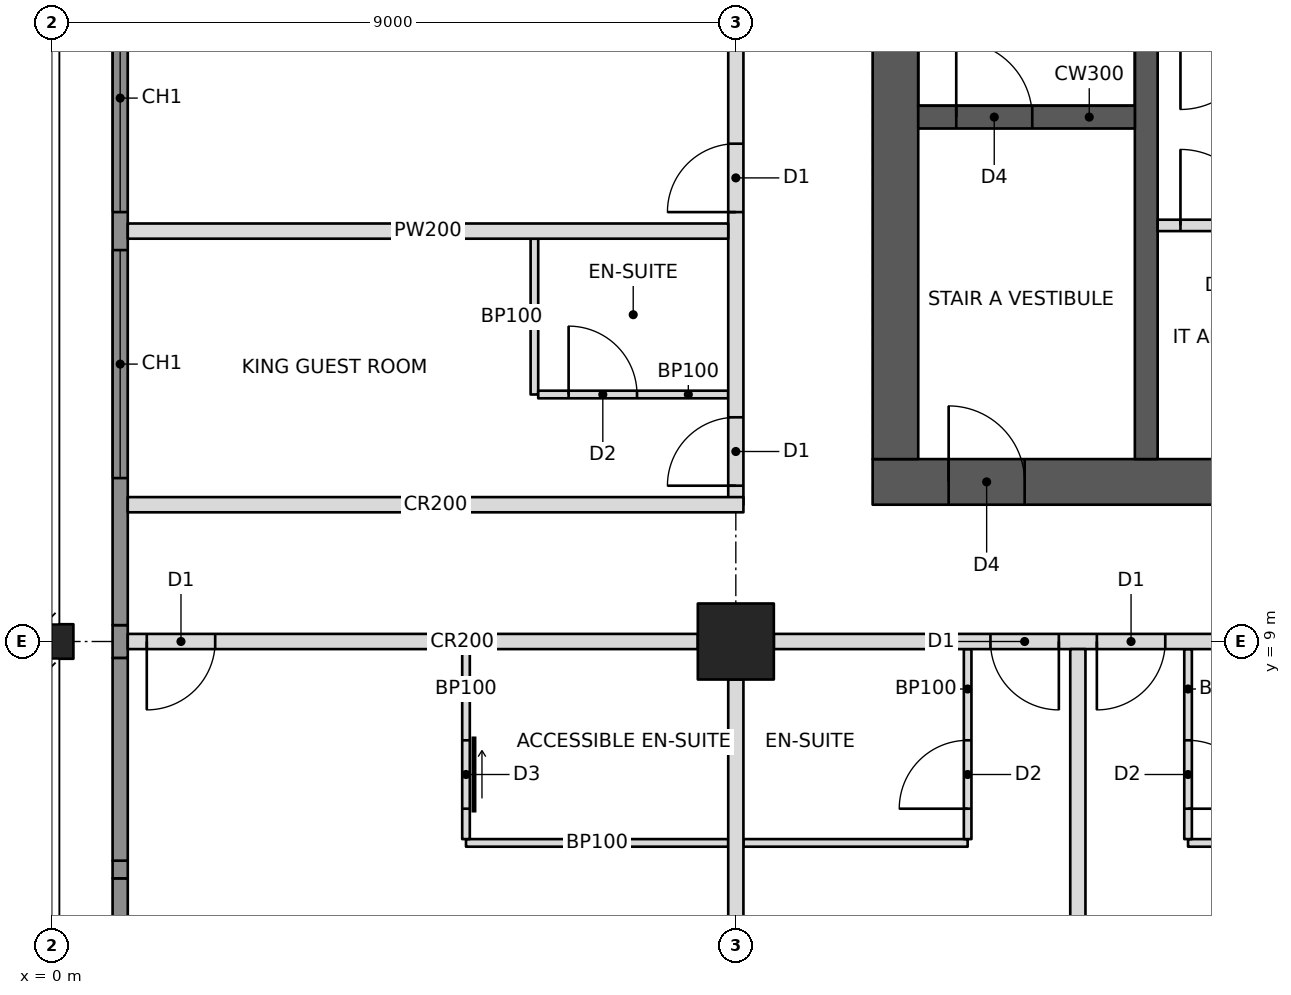
"""IFC4 building model, lengths in metres.
Left out: names, types, materials, properties, quantities, classifications, styles, units other than length and angle.
Written with IfcOpenShell. Run it as: python <this file> out.ifc"""

import sys

from ifc_helpers import new_model, si_unit, direction, frame, frame_2d, origin, origin_2d, place, context, subcontext, project, spatial, rectangle, hollow_rectangle, i_section, extrude, element, fill, save


model = new_model("IFC4")
c1 = context("Model", 3, precision=1e-05, world=origin(), true_north=direction((0.0, 1.0)))
c2 = subcontext(c1, "Body", "Model", "MODEL_VIEW")
j1 = project(units=[si_unit("LENGTHUNIT", "METRE"), si_unit("PLANEANGLEUNIT", "RADIAN")], contexts=[c1])
p1 = place(None, origin())
s1 = spatial("IfcSite", under=j1, at=p1, CompositionType="ELEMENT")
p2 = place(p1, origin())
s2 = spatial("IfcBuilding", under=s1, at=p2, CompositionType="ELEMENT")
p3 = place(p2, frame((0.0, 0.0, 85.8)))
s3 = spatial("IfcBuildingStorey", under=s2, at=p3, CompositionType="ELEMENT", Elevation=85.8)
p4 = place(p3, frame((0.0, 9.0, 0.0), z_axis=(0.0, 0.0, 1.0), x_axis=(0.0, 1.0, 0.0)))
e1 = element("IfcColumn", 1, at=p4, inside=s3, PredefinedType="COLUMN", context=c2, shape_type="SweptSolid", body=[
    extrude(i_section(OverallWidth=0.455, OverallDepth=0.569, WebThickness=0.078, FlangeThickness=0.125, at=origin_2d()), origin(), (0.0, 0.0, 1.0), 3.4),
])
p5 = place(p3, frame((9.0, 9.0, 0.0), z_axis=(0.0, 0.0, 1.0), x_axis=(1.0, 0.0, 0.0)))
e2 = element("IfcColumn", 2, at=p5, inside=s3, PredefinedType="COLUMN", context=c2, shape_type="SweptSolid", body=[
    extrude(hollow_rectangle(XDim=1.0, YDim=1.0, WallThickness=0.1, at=origin_2d()), origin(), (0.0, 0.0, 1.0), 3.4),
])
p6 = place(p3, frame((10.8, 11.1, 0.0), z_axis=(0.0, 0.0, 1.0), x_axis=(1.0, 0.0, 0.0)))
e3 = element("IfcWall", 3, at=p6, inside=s3, PredefinedType="SHEAR", context=c2, shape_type="SweptSolid", body=[
    extrude(rectangle(XDim=23.4, YDim=0.6, at=frame_2d((11.7, 0.0))), origin(), (0.0, 0.0, 1.0), 3.4),
])
p7 = place(p6, frame((1.0, 0.0, 0.0)))
e4 = element("IfcOpeningElement", 4, at=p7, cuts=e3, PredefinedType="OPENING", context=c2, shape_type="SweptSolid", body=[
    extrude(rectangle(XDim=1.0, YDim=2.1, at=frame_2d((0.5, 1.05))), frame((0.0, 0.31, 0.0), z_axis=(0.0, -1.0, 0.0), x_axis=(1.0, 0.0, 0.0)), (0.0, 0.0, 1.0), 0.62),
])
p8 = place(p6, frame((17.2, 0.0, 0.0)))
e5 = element("IfcOpeningElement", 5, at=p8, cuts=e3, PredefinedType="OPENING", context=c2, shape_type="SweptSolid", body=[
    extrude(rectangle(XDim=1.8, YDim=2.1, at=frame_2d((0.9, 1.05))), frame((0.0, 0.31, 0.0), z_axis=(0.0, -1.0, 0.0), x_axis=(1.0, 0.0, 0.0)), (0.0, 0.0, 1.0), 0.62),
])
p9 = place(p3, frame((11.1, 11.4, 0.0), z_axis=(0.0, 0.0, 1.0), x_axis=(0.0, 1.0, 0.0)))
e6 = element("IfcWall", 6, at=p9, inside=s3, PredefinedType="SHEAR", context=c2, shape_type="SweptSolid", body=[
    extrude(rectangle(XDim=13.2, YDim=0.6, at=frame_2d((6.6, 0.0))), origin(), (0.0, 0.0, 1.0), 3.4),
])
p10 = place(p3, frame((14.4, 11.4, 0.0), z_axis=(0.0, 0.0, 1.0), x_axis=(0.0, 1.0, 0.0)))
e7 = element("IfcWall", 7, at=p10, inside=s3, PredefinedType="SHEAR", context=c2, shape_type="SweptSolid", body=[
    extrude(rectangle(XDim=13.2, YDim=0.3, at=frame_2d((6.6, 0.0))), origin(), (0.0, 0.0, 1.0), 3.4),
])
p11 = place(p3, frame((11.4, 15.9, 0.0), z_axis=(0.0, 0.0, 1.0), x_axis=(1.0, 0.0, 0.0)))
e8 = element("IfcWall", 8, at=p11, inside=s3, PredefinedType="SHEAR", context=c2, shape_type="SweptSolid", body=[
    extrude(rectangle(XDim=2.85, YDim=0.3, at=frame_2d((1.425, 0.0))), origin(), (0.0, 0.0, 1.0), 3.4),
])
p12 = place(p11, frame((0.5, 0.0, 0.0)))
e9 = element("IfcOpeningElement", 9, at=p12, cuts=e8, PredefinedType="OPENING", context=c2, shape_type="SweptSolid", body=[
    extrude(rectangle(XDim=1.0, YDim=2.1, at=frame_2d((0.5, 1.05))), frame((0.0, 0.16, 0.0), z_axis=(0.0, -1.0, 0.0), x_axis=(1.0, 0.0, 0.0)), (0.0, 0.0, 1.0), 0.32),
])
p13 = place(p3, frame((1.0, 9.0, 0.0), z_axis=(0.0, 0.0, 1.0), x_axis=(1.0, 0.0, 0.0)))
e10 = element("IfcWall", 10, at=p13, inside=s3, PredefinedType="PARTITIONING", context=c2, shape_type="SweptSolid", body=[
    extrude(rectangle(XDim=7.5, YDim=0.2, at=frame_2d((3.75, 0.0))), origin(), (0.0, 0.0, 1.0), 2.21),
])
p14 = place(p13, frame((0.25, 0.0, 0.0)))
e11 = element("IfcOpeningElement", 11, at=p14, cuts=e10, PredefinedType="OPENING", context=c2, shape_type="SweptSolid", body=[
    extrude(rectangle(XDim=0.9, YDim=2.1, at=frame_2d((0.45, 1.05))), frame((0.0, 0.11, 0.0), z_axis=(0.0, -1.0, 0.0), x_axis=(1.0, 0.0, 0.0)), (0.0, 0.0, 1.0), 0.22),
])
p15 = place(p3, frame((9.5, 9.0, 0.0), z_axis=(0.0, 0.0, 1.0), x_axis=(1.0, 0.0, 0.0)))
e12 = element("IfcWall", 12, at=p15, inside=s3, PredefinedType="PARTITIONING", context=c2, shape_type="SweptSolid", body=[
    extrude(rectangle(XDim=8.0, YDim=0.2, at=frame_2d((4.0, 0.0))), origin(), (0.0, 0.0, 1.0), 2.21),
])
p16 = place(p15, frame((2.85, 0.0, 0.0)))
e13 = element("IfcOpeningElement", 13, at=p16, cuts=e12, PredefinedType="OPENING", context=c2, shape_type="SweptSolid", body=[
    extrude(rectangle(XDim=0.9, YDim=2.1, at=frame_2d((0.45, 1.05))), frame((0.0, 0.11, 0.0), z_axis=(0.0, -1.0, 0.0), x_axis=(1.0, 0.0, 0.0)), (0.0, 0.0, 1.0), 0.22),
])
p17 = place(p15, frame((4.25, 0.0, 0.0)))
e14 = element("IfcOpeningElement", 14, at=p17, cuts=e12, PredefinedType="OPENING", context=c2, shape_type="SweptSolid", body=[
    extrude(rectangle(XDim=0.9, YDim=2.1, at=frame_2d((0.45, 1.05))), frame((0.0, 0.11, 0.0), z_axis=(0.0, -1.0, 0.0), x_axis=(1.0, 0.0, 0.0)), (0.0, 0.0, 1.0), 0.22),
])
p18 = place(p3, frame((9.0, 10.8, 0.0), z_axis=(0.0, 0.0, 1.0), x_axis=(0.0, 1.0, 0.0)))
e15 = element("IfcWall", 15, at=p18, inside=s3, PredefinedType="PARTITIONING", context=c2, shape_type="SweptSolid", body=[
    extrude(rectangle(XDim=6.7, YDim=0.2, at=frame_2d((3.35, 0.0))), origin(), (0.0, 0.0, 1.0), 2.21),
])
p19 = place(p18, frame((0.25, 0.0, 0.0)))
e16 = element("IfcOpeningElement", 16, at=p19, cuts=e15, PredefinedType="OPENING", context=c2, shape_type="SweptSolid", body=[
    extrude(rectangle(XDim=0.9, YDim=2.1, at=frame_2d((0.45, 1.05))), frame((0.0, 0.11, 0.0), z_axis=(0.0, -1.0, 0.0), x_axis=(1.0, 0.0, 0.0)), (0.0, 0.0, 1.0), 0.22),
])
p20 = place(p18, frame((3.85, 0.0, 0.0)))
e17 = element("IfcOpeningElement", 17, at=p20, cuts=e15, PredefinedType="OPENING", context=c2, shape_type="SweptSolid", body=[
    extrude(rectangle(XDim=0.9, YDim=2.1, at=frame_2d((0.45, 1.05))), frame((0.0, 0.11, 0.0), z_axis=(0.0, -1.0, 0.0), x_axis=(1.0, 0.0, 0.0)), (0.0, 0.0, 1.0), 0.22),
])
p21 = place(p3, frame((1.0, 10.8, 0.0), z_axis=(0.0, 0.0, 1.0), x_axis=(1.0, 0.0, 0.0)))
e18 = element("IfcWall", 18, at=p21, inside=s3, PredefinedType="PARTITIONING", context=c2, shape_type="SweptSolid", body=[
    extrude(rectangle(XDim=8.1, YDim=0.2, at=frame_2d((4.05, 0.0))), origin(), (0.0, 0.0, 1.0), 2.21),
])
p22 = place(p3, frame((9.0, 8.5, 0.0), z_axis=(0.0, 0.0, 1.0), x_axis=(0.0, -1.0, 0.0)))
e19 = element("IfcWall", 19, at=p22, inside=s3, PredefinedType="PARTITIONING", context=c2, shape_type="SweptSolid", body=[
    extrude(rectangle(XDim=7.5, YDim=0.2, at=frame_2d((3.75, 0.0))), origin(), (0.0, 0.0, 1.0), 2.21),
])
p23 = place(p3, frame((13.5, 8.9, 0.0), z_axis=(0.0, 0.0, 1.0), x_axis=(0.0, -1.0, 0.0)))
e20 = element("IfcWall", 20, at=p23, inside=s3, PredefinedType="PARTITIONING", context=c2, shape_type="SweptSolid", body=[
    extrude(rectangle(XDim=7.9, YDim=0.2, at=frame_2d((3.95, 0.0))), origin(), (0.0, 0.0, 1.0), 2.21),
])
p24 = place(p3, frame((5.45, 6.35, 0.0), z_axis=(0.0, 0.0, 1.0), x_axis=(1.0, 0.0, 0.0)))
e21 = element("IfcWall", 21, at=p24, inside=s3, PredefinedType="PARTITIONING", context=c2, shape_type="SweptSolid", body=[
    extrude(rectangle(XDim=3.45, YDim=0.1, at=frame_2d((1.725, 0.0))), origin(), (0.0, 0.0, 1.0), 2.21),
])
p25 = place(p3, frame((5.45, 8.9, 0.0), z_axis=(0.0, 0.0, 1.0), x_axis=(0.0, -1.0, 0.0)))
e22 = element("IfcWall", 22, at=p25, inside=s3, PredefinedType="PARTITIONING", context=c2, shape_type="SweptSolid", body=[
    extrude(rectangle(XDim=2.5, YDim=0.1, at=frame_2d((1.25, 0.0))), origin(), (0.0, 0.0, 1.0), 2.21),
])
p26 = place(p25, frame((1.2, 0.0, 0.0)))
e23 = element("IfcOpeningElement", 23, at=p26, cuts=e22, PredefinedType="OPENING", context=c2, shape_type="SweptSolid", body=[
    extrude(rectangle(XDim=0.9, YDim=2.1, at=frame_2d((0.45, 1.05))), frame((0.0, 0.06, 0.0), z_axis=(0.0, -1.0, 0.0), x_axis=(1.0, 0.0, 0.0)), (0.0, 0.0, 1.0), 0.12),
])
p27 = place(p3, frame((9.1, 6.35, 0.0), z_axis=(0.0, 0.0, 1.0), x_axis=(1.0, 0.0, 0.0)))
e24 = element("IfcWall", 24, at=p27, inside=s3, PredefinedType="PARTITIONING", context=c2, shape_type="SweptSolid", body=[
    extrude(rectangle(XDim=2.95, YDim=0.1, at=frame_2d((1.475, 0.0))), origin(), (0.0, 0.0, 1.0), 2.21),
])
p28 = place(p3, frame((12.05, 8.9, 0.0), z_axis=(0.0, 0.0, 1.0), x_axis=(0.0, -1.0, 0.0)))
e25 = element("IfcWall", 25, at=p28, inside=s3, PredefinedType="PARTITIONING", context=c2, shape_type="SweptSolid", body=[
    extrude(rectangle(XDim=2.5, YDim=0.1, at=frame_2d((1.25, 0.0))), origin(), (0.0, 0.0, 1.0), 2.21),
])
p29 = place(p28, frame((1.2, 0.0, 0.0)))
e26 = element("IfcOpeningElement", 26, at=p29, cuts=e25, PredefinedType="OPENING", context=c2, shape_type="SweptSolid", body=[
    extrude(rectangle(XDim=0.9, YDim=2.1, at=frame_2d((0.45, 1.05))), frame((0.0, 0.06, 0.0), z_axis=(0.0, -1.0, 0.0), x_axis=(1.0, 0.0, 0.0)), (0.0, 0.0, 1.0), 0.12),
])
p30 = place(p3, frame((14.95, 6.35, 0.0), z_axis=(0.0, 0.0, 1.0), x_axis=(1.0, 0.0, 0.0)))
e27 = element("IfcWall", 27, at=p30, inside=s3, PredefinedType="PARTITIONING", context=c2, shape_type="SweptSolid", body=[
    extrude(rectangle(XDim=2.95, YDim=0.1, at=frame_2d((1.475, 0.0))), origin(), (0.0, 0.0, 1.0), 2.202),
])
p31 = place(p3, frame((14.95, 8.9, 0.0), z_axis=(0.0, 0.0, 1.0), x_axis=(0.0, -1.0, 0.0)))
e28 = element("IfcWall", 28, at=p31, inside=s3, PredefinedType="PARTITIONING", context=c2, shape_type="SweptSolid", body=[
    extrude(rectangle(XDim=2.5, YDim=0.1, at=frame_2d((1.25, 0.0))), origin(), (0.0, 0.0, 1.0), 2.21),
])
p32 = place(p31, frame((1.2, 0.0, 0.0)))
e29 = element("IfcOpeningElement", 29, at=p32, cuts=e28, PredefinedType="OPENING", context=c2, shape_type="SweptSolid", body=[
    extrude(rectangle(XDim=0.9, YDim=2.1, at=frame_2d((0.45, 1.05))), frame((0.0, 0.06, 0.0), z_axis=(0.0, -1.0, 0.0), x_axis=(1.0, 0.0, 0.0)), (0.0, 0.0, 1.0), 0.12),
])
p33 = place(p3, frame((8.9, 14.4, 0.0), z_axis=(0.0, 0.0, 1.0), x_axis=(-1.0, 0.0, 0.0)))
e30 = element("IfcWall", 30, at=p33, inside=s3, PredefinedType="PARTITIONING", context=c2, shape_type="SweptSolid", body=[
    extrude(rectangle(XDim=7.9, YDim=0.2, at=frame_2d((3.95, 0.0))), origin(), (0.0, 0.0, 1.0), 2.21),
])
p34 = place(p3, frame((6.35, 12.25, 0.0), z_axis=(0.0, 0.0, 1.0), x_axis=(0.0, 1.0, 0.0)))
e31 = element("IfcWall", 31, at=p34, inside=s3, PredefinedType="PARTITIONING", context=c2, shape_type="SweptSolid", body=[
    extrude(rectangle(XDim=2.05, YDim=0.1, at=frame_2d((1.025, 0.0))), origin(), (0.0, 0.0, 1.0), 3.15),
])
p35 = place(p3, frame((8.9, 12.25, 0.0), z_axis=(0.0, 0.0, 1.0), x_axis=(-1.0, 0.0, 0.0)))
e32 = element("IfcWall", 32, at=p35, inside=s3, PredefinedType="PARTITIONING", context=c2, shape_type="SweptSolid", body=[
    extrude(rectangle(XDim=2.5, YDim=0.1, at=frame_2d((1.25, 0.0))), origin(), (0.0, 0.0, 1.0), 2.21),
])
p36 = place(p35, frame((1.2, 0.0, 0.0)))
e33 = element("IfcOpeningElement", 33, at=p36, cuts=e32, PredefinedType="OPENING", context=c2, shape_type="SweptSolid", body=[
    extrude(rectangle(XDim=0.9, YDim=2.1, at=frame_2d((0.45, 1.05))), frame((0.0, 0.06, 0.0), z_axis=(0.0, -1.0, 0.0), x_axis=(1.0, 0.0, 0.0)), (0.0, 0.0, 1.0), 0.12),
])
p37 = place(p3, frame((14.55, 14.475, 0.0), z_axis=(0.0, 0.0, 1.0), x_axis=(1.0, 0.0, 0.0)))
e34 = element("IfcWall", 34, at=p37, inside=s3, PredefinedType="PARTITIONING", context=c2, shape_type="SweptSolid", body=[
    extrude(rectangle(XDim=3.3, YDim=0.15, at=frame_2d((1.65, 0.0))), origin(), (0.0, 0.0, 1.0), 3.15),
])
p38 = place(p37, frame((0.3, 0.0, 0.0)))
e35 = element("IfcOpeningElement", 35, at=p38, cuts=e34, PredefinedType="OPENING", context=c2, shape_type="SweptSolid", body=[
    extrude(rectangle(XDim=1.0, YDim=2.1, at=frame_2d((0.5, 1.05))), frame((0.0, 0.085, 0.0), z_axis=(0.0, -1.0, 0.0), x_axis=(1.0, 0.0, 0.0)), (0.0, 0.0, 1.0), 0.17),
])
p39 = place(p3, frame((0.9, 3.116, 0.0), z_axis=(0.0, 0.0, 1.0), x_axis=(0.0, 1.0, 0.0)))
e36 = element("IfcWall", 36, at=p39, inside=s3, PredefinedType="SOLIDWALL", context=c2, shape_type="SweptSolid", body=[
    extrude(rectangle(XDim=2.768, YDim=0.2, at=frame_2d((1.384, 0.0))), origin(), (0.0, 0.0, 1.0), 3.15),
])
p40 = place(p3, frame((0.9, 5.884, 0.0), z_axis=(0.0, 0.0, 1.0), x_axis=(0.0, 1.0, 0.0)))
e37 = element("IfcWall", 37, at=p40, inside=s3, PredefinedType="SOLIDWALL", context=c2, shape_type="SweptSolid", body=[
    extrude(rectangle(XDim=0.232, YDim=0.2, at=frame_2d((0.116, 0.0))), origin(), (0.0, 0.0, 1.0), 2.542),
])
p41 = place(p3, frame((0.9, 6.116, 0.0), z_axis=(0.0, 0.0, 1.0), x_axis=(0.0, 1.0, 0.0)))
e38 = element("IfcWall", 38, at=p41, inside=s3, PredefinedType="SOLIDWALL", context=c2, shape_type="SweptSolid", body=[
    extrude(rectangle(XDim=2.668, YDim=0.2, at=frame_2d((1.334, 0.0))), origin(), (0.0, 0.0, 1.0), 3.15),
])
p42 = place(p3, frame((0.9, 8.785, 0.0), z_axis=(0.0, 0.0, 1.0), x_axis=(0.0, 1.0, 0.0)))
e39 = element("IfcWall", 39, at=p42, inside=s3, PredefinedType="SOLIDWALL", context=c2, shape_type="SweptSolid", body=[
    extrude(rectangle(XDim=0.431, YDim=0.2, at=frame_2d((0.215, 0.0))), origin(), (0.0, 0.0, 1.0), 2.21),
])
p43 = place(p3, frame((0.9, 9.215, 0.0), z_axis=(0.0, 0.0, 1.0), x_axis=(0.0, 1.0, 0.0)))
e40 = element("IfcWall", 40, at=p43, inside=s3, PredefinedType="SOLIDWALL", context=c2, shape_type="SweptSolid", body=[
    extrude(rectangle(XDim=8.571, YDim=0.2, at=frame_2d((4.285, 0.0))), origin(), (0.0, 0.0, 1.0), 3.15),
])
p44 = place(p43, frame((1.935, 0.0, 0.6)))
e41 = element("IfcOpeningElement", 41, at=p44, cuts=e40, PredefinedType="OPENING", context=c2, shape_type="SweptSolid", body=[
    extrude(rectangle(XDim=3.0, YDim=2.2, at=frame_2d((1.5, 1.1))), frame((0.0, 0.11, 0.0), z_axis=(0.0, -1.0, 0.0), x_axis=(1.0, 0.0, 0.0)), (0.0, 0.0, 1.0), 0.22),
])
p45 = place(p43, frame((5.435, 0.0, 0.6)))
e42 = element("IfcOpeningElement", 42, at=p45, cuts=e40, PredefinedType="OPENING", context=c2, shape_type="SweptSolid", body=[
    extrude(rectangle(XDim=3.0, YDim=2.2, at=frame_2d((1.5, 1.1))), frame((0.0, 0.11, 0.0), z_axis=(0.0, -1.0, 0.0), x_axis=(1.0, 0.0, 0.0)), (0.0, 0.0, 1.0), 0.22),
])
p46 = place(p44, origin())
e43 = element("IfcWindow", 43, at=p46, inside=s3, PartitioningType="TRIPLE_PANEL_VERTICAL", PredefinedType="WINDOW", context=c2, shape_type="SweptSolid", body=[
    extrude(rectangle(XDim=3.0, YDim=2.2, at=frame_2d((1.5, 1.1))), frame((0.0, 0.03, 0.0), z_axis=(0.0, -1.0, 0.0), x_axis=(1.0, 0.0, 0.0)), (0.0, 0.0, 1.0), 0.06),
])
fill(e41, e43)
p47 = place(p45, origin())
e44 = element("IfcWindow", 44, at=p47, inside=s3, PartitioningType="TRIPLE_PANEL_VERTICAL", PredefinedType="WINDOW", context=c2, shape_type="SweptSolid", body=[
    extrude(rectangle(XDim=3.0, YDim=2.2, at=frame_2d((1.5, 1.1))), frame((0.0, 0.03, 0.0), z_axis=(0.0, -1.0, 0.0), x_axis=(1.0, 0.0, 0.0)), (0.0, 0.0, 1.0), 0.06),
])
fill(e42, e44)
p48 = place(p26, origin())
e45 = element("IfcDoor", 45, at=p48, inside=s3, OperationType="SLIDING_TO_LEFT", PredefinedType="DOOR", context=c2, shape_type="SweptSolid", body=[
    extrude(rectangle(XDim=0.9, YDim=2.1, at=frame_2d((0.45, 1.05))), frame((0.0, 0.025, 0.0), z_axis=(0.0, -1.0, 0.0), x_axis=(1.0, 0.0, 0.0)), (0.0, 0.0, 1.0), 0.05),
])
fill(e23, e45)
p49 = place(p14, frame((0.9, 0.0, 0.0), z_axis=(0.0, 0.0, 1.0), x_axis=(-1.0, 0.0, 0.0)))
e46 = element("IfcDoor", 46, at=p49, inside=s3, OperationType="SINGLE_SWING_RIGHT", PredefinedType="DOOR", context=c2, shape_type="SweptSolid", body=[
    extrude(rectangle(XDim=0.9, YDim=2.1, at=frame_2d((0.45, 1.05))), frame((0.0, 0.025, 0.0), z_axis=(0.0, -1.0, 0.0), x_axis=(1.0, 0.0, 0.0)), (0.0, 0.0, 1.0), 0.05),
])
fill(e11, e46)
p50 = place(p29, frame((0.9, 0.0, 0.0), z_axis=(0.0, 0.0, 1.0), x_axis=(-1.0, 0.0, 0.0)))
e47 = element("IfcDoor", 47, at=p50, inside=s3, OperationType="SINGLE_SWING_LEFT", PredefinedType="DOOR", context=c2, shape_type="SweptSolid", body=[
    extrude(rectangle(XDim=0.9, YDim=2.1, at=frame_2d((0.45, 1.05))), frame((0.0, 0.025, 0.0), z_axis=(0.0, -1.0, 0.0), x_axis=(1.0, 0.0, 0.0)), (0.0, 0.0, 1.0), 0.05),
])
fill(e26, e47)
p51 = place(p16, frame((0.9, 0.0, 0.0), z_axis=(0.0, 0.0, 1.0), x_axis=(-1.0, 0.0, 0.0)))
e48 = element("IfcDoor", 48, at=p51, inside=s3, OperationType="SINGLE_SWING_LEFT", PredefinedType="DOOR", context=c2, shape_type="SweptSolid", body=[
    extrude(rectangle(XDim=0.9, YDim=2.1, at=frame_2d((0.45, 1.05))), frame((0.0, 0.025, 0.0), z_axis=(0.0, -1.0, 0.0), x_axis=(1.0, 0.0, 0.0)), (0.0, 0.0, 1.0), 0.05),
])
fill(e13, e48)
p52 = place(p32, origin())
e49 = element("IfcDoor", 49, at=p52, inside=s3, OperationType="SINGLE_SWING_RIGHT", PredefinedType="DOOR", context=c2, shape_type="SweptSolid", body=[
    extrude(rectangle(XDim=0.9, YDim=2.1, at=frame_2d((0.45, 1.05))), frame((0.0, 0.025, 0.0), z_axis=(0.0, -1.0, 0.0), x_axis=(1.0, 0.0, 0.0)), (0.0, 0.0, 1.0), 0.05),
])
fill(e29, e49)
p53 = place(p17, frame((0.9, 0.0, 0.0), z_axis=(0.0, 0.0, 1.0), x_axis=(-1.0, 0.0, 0.0)))
e50 = element("IfcDoor", 50, at=p53, inside=s3, OperationType="SINGLE_SWING_RIGHT", PredefinedType="DOOR", context=c2, shape_type="SweptSolid", body=[
    extrude(rectangle(XDim=0.9, YDim=2.1, at=frame_2d((0.45, 1.05))), frame((0.0, 0.025, 0.0), z_axis=(0.0, -1.0, 0.0), x_axis=(1.0, 0.0, 0.0)), (0.0, 0.0, 1.0), 0.05),
])
fill(e14, e50)
p54 = place(p36, frame((0.9, 0.0, 0.0), z_axis=(0.0, 0.0, 1.0), x_axis=(-1.0, 0.0, 0.0)))
e51 = element("IfcDoor", 51, at=p54, inside=s3, OperationType="SINGLE_SWING_LEFT", PredefinedType="DOOR", context=c2, shape_type="SweptSolid", body=[
    extrude(rectangle(XDim=0.9, YDim=2.1, at=frame_2d((0.45, 1.05))), frame((0.0, 0.025, 0.0), z_axis=(0.0, -1.0, 0.0), x_axis=(1.0, 0.0, 0.0)), (0.0, 0.0, 1.0), 0.05),
])
fill(e33, e51)
p55 = place(p19, origin())
e52 = element("IfcDoor", 52, at=p55, inside=s3, OperationType="SINGLE_SWING_LEFT", PredefinedType="DOOR", context=c2, shape_type="SweptSolid", body=[
    extrude(rectangle(XDim=0.9, YDim=2.1, at=frame_2d((0.45, 1.05))), frame((0.0, 0.025, 0.0), z_axis=(0.0, -1.0, 0.0), x_axis=(1.0, 0.0, 0.0)), (0.0, 0.0, 1.0), 0.05),
])
fill(e16, e52)
p56 = place(p20, origin())
e53 = element("IfcDoor", 53, at=p56, inside=s3, OperationType="SINGLE_SWING_LEFT", PredefinedType="DOOR", context=c2, shape_type="SweptSolid", body=[
    extrude(rectangle(XDim=0.9, YDim=2.1, at=frame_2d((0.45, 1.05))), frame((0.0, 0.025, 0.0), z_axis=(0.0, -1.0, 0.0), x_axis=(1.0, 0.0, 0.0)), (0.0, 0.0, 1.0), 0.05),
])
fill(e17, e53)
p57 = place(p38, origin())
e54 = element("IfcDoor", 54, at=p57, inside=s3, OperationType="SINGLE_SWING_LEFT", PredefinedType="DOOR", context=c2, shape_type="SweptSolid", body=[
    extrude(rectangle(XDim=1.0, YDim=2.1, at=frame_2d((0.5, 1.05))), frame((0.0, 0.025, 0.0), z_axis=(0.0, -1.0, 0.0), x_axis=(1.0, 0.0, 0.0)), (0.0, 0.0, 1.0), 0.05),
])
fill(e35, e54)
p58 = place(p7, origin())
e55 = element("IfcDoor", 55, at=p58, inside=s3, OperationType="SINGLE_SWING_LEFT", PredefinedType="DOOR", context=c2, shape_type="SweptSolid", body=[
    extrude(rectangle(XDim=1.0, YDim=2.1, at=frame_2d((0.5, 1.05))), frame((0.0, 0.025, 0.0), z_axis=(0.0, -1.0, 0.0), x_axis=(1.0, 0.0, 0.0)), (0.0, 0.0, 1.0), 0.05),
])
fill(e4, e55)
p59 = place(p12, origin())
e56 = element("IfcDoor", 56, at=p59, inside=s3, OperationType="SINGLE_SWING_LEFT", PredefinedType="DOOR", context=c2, shape_type="SweptSolid", body=[
    extrude(rectangle(XDim=1.0, YDim=2.1, at=frame_2d((0.5, 1.05))), frame((0.0, 0.025, 0.0), z_axis=(0.0, -1.0, 0.0), x_axis=(1.0, 0.0, 0.0)), (0.0, 0.0, 1.0), 0.05),
])
fill(e9, e56)
save(model, sys.argv[1])
